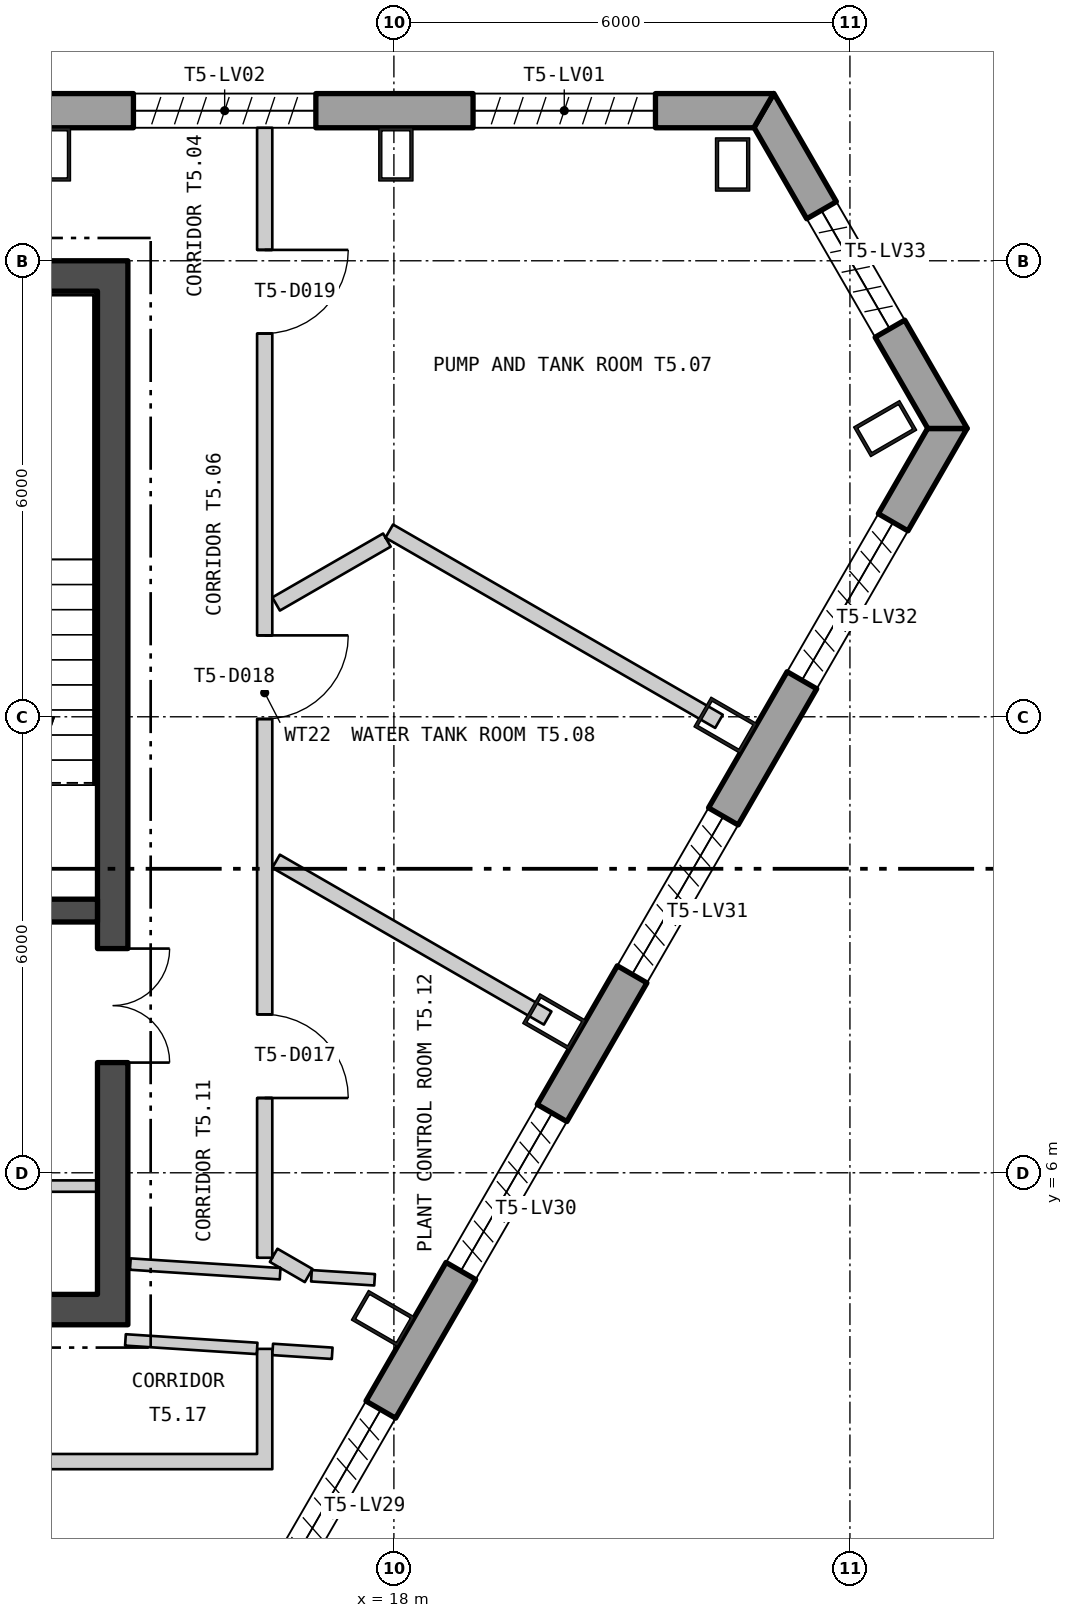
"""IFC4 building model, lengths in metres.
Left out: names, types, materials, properties, quantities, classifications, styles, units other than length and angle.
Written with IfcOpenShell. Run it as: python <this file> out.ifc"""

import sys

from ifc_helpers import new_model, si_unit, direction, frame, frame_2d, origin, origin_2d, place, context, subcontext, project, spatial, polyline, rectangle, hollow_rectangle, outline, extrude, element, fill, save


model = new_model("IFC4")
c1 = context("Model", 3, precision=1e-05, world=origin(), true_north=direction((0.0, 1.0)))
c2 = subcontext(c1, "Body", "Model", "MODEL_VIEW")
j1 = project(units=[si_unit("LENGTHUNIT", "METRE"), si_unit("PLANEANGLEUNIT", "RADIAN")], contexts=[c1])
p1 = place(None, origin())
s1 = spatial("IfcSite", under=j1, at=p1, CompositionType="ELEMENT")
p2 = place(p1, origin())
s2 = spatial("IfcBuilding", under=s1, at=p2, CompositionType="ELEMENT")
p3 = place(p2, frame((0.0, 0.0, 292.2)))
s3 = spatial("IfcBuildingStorey", under=s2, at=p3, CompositionType="ELEMENT", Elevation=292.2)
for number, where, z_axis, x_axis in (
    (1, (22.456, 19.267, 0.0), (0.0, 0.0, 1.0), (-1.0, 0.0, 0.0)),
    (2, (18.026, 19.4, 0.0), (0.0, 0.0, 1.0), (-1.0, 0.0, 0.0)),
    (3, (13.52, 19.4, 0.0), (0.0, 0.0, 1.0), (-1.0, 0.0, 0.0)),
    (4, (17.856, 4.083, 0.0), (0.0, 0.0, 1.0), (0.5, 0.866, 0.0)),
    (5, (20.11, 7.986, 0.0), (0.0, 0.0, 1.0), (0.5, 0.866, 0.0)),
    (6, (22.363, 11.889, 0.0), (0.0, 0.0, 1.0), (0.5, 0.866, 0.0)),
    (7, (24.463, 15.792, 0.0), (0.0, 0.0, 1.0), (-0.5, 0.866, 0.0)),
):
    element("IfcColumn", number, at=place(p3, frame(where, z_axis=z_axis, x_axis=x_axis)), inside=s3, PredefinedType="COLUMN", context=c2, shape_type="SweptSolid", body=[
        extrude(hollow_rectangle(XDim=0.45, YDim=0.7, WallThickness=0.04, at=origin_2d()), origin(), (0.0, 0.0, 1.0), 6.0),
    ])
p4 = place(p3, frame((22.865, 19.975, -0.4), z_axis=(0.0, 0.0, 1.0), x_axis=(-1.0, 0.0, 0.0)))
e8 = element("IfcWall", 8, at=p4, inside=s3, PredefinedType="SOLIDWALL", context=c2, shape_type="SweptSolid", body=[
    extrude(outline(polyline([(-0.13, -0.225), (45.86, -0.225), (45.6, 0.225), (0.13, 0.225), (-0.13, -0.225)])), origin(), (0.0, 0.0, 1.0), 6.0),
])
p5 = place(p4, frame((1.424, 0.0, 1.6)))
e9 = element("IfcOpeningElement", 9, at=p5, cuts=e8, PredefinedType="OPENING", context=c2, shape_type="SweptSolid", body=[
    extrude(rectangle(XDim=2.4, YDim=3.6, at=frame_2d((1.2, 1.8))), frame((0.0, 0.235, 0.0), z_axis=(0.0, -1.0, 0.0), x_axis=(1.0, 0.0, 0.0)), (0.0, 0.0, 1.0), 0.47),
])
p6 = place(p4, frame((5.892, 0.0, 1.6)))
e10 = element("IfcOpeningElement", 10, at=p6, cuts=e8, PredefinedType="OPENING", context=c2, shape_type="SweptSolid", body=[
    extrude(rectangle(XDim=2.4, YDim=3.6, at=frame_2d((1.2, 1.8))), frame((0.0, 0.235, 0.0), z_axis=(0.0, -1.0, 0.0), x_axis=(1.0, 0.0, 0.0)), (0.0, 0.0, 1.0), 0.47),
])
p7 = place(p4, frame((10.399, 0.0, 1.6)))
e11 = element("IfcOpeningElement", 11, at=p7, cuts=e8, PredefinedType="OPENING", context=c2, shape_type="SweptSolid", body=[
    extrude(rectangle(XDim=2.4, YDim=3.6, at=frame_2d((1.2, 1.8))), frame((0.0, 0.235, 0.0), z_axis=(0.0, -1.0, 0.0), x_axis=(1.0, 0.0, 0.0)), (0.0, 0.0, 1.0), 0.47),
])
p8 = place(p4, frame((14.905, 0.0, 1.6)))
e12 = element("IfcOpeningElement", 12, at=p8, cuts=e8, PredefinedType="OPENING", context=c2, shape_type="SweptSolid", body=[
    extrude(rectangle(XDim=2.4, YDim=3.6, at=frame_2d((1.2, 1.8))), frame((0.0, 0.235, 0.0), z_axis=(0.0, -1.0, 0.0), x_axis=(1.0, 0.0, 0.0)), (0.0, 0.0, 1.0), 0.47),
])
p9 = place(p4, frame((19.412, 0.0, 1.6)))
e13 = element("IfcOpeningElement", 13, at=p9, cuts=e8, PredefinedType="OPENING", context=c2, shape_type="SweptSolid", body=[
    extrude(rectangle(XDim=2.4, YDim=3.6, at=frame_2d((1.2, 1.8))), frame((0.0, 0.235, 0.0), z_axis=(0.0, -1.0, 0.0), x_axis=(1.0, 0.0, 0.0)), (0.0, 0.0, 1.0), 0.47),
])
p10 = place(p4, frame((23.918, 0.0, 1.6)))
e14 = element("IfcOpeningElement", 14, at=p10, cuts=e8, PredefinedType="OPENING", context=c2, shape_type="SweptSolid", body=[
    extrude(rectangle(XDim=2.4, YDim=3.6, at=frame_2d((1.2, 1.8))), frame((0.0, 0.235, 0.0), z_axis=(0.0, -1.0, 0.0), x_axis=(1.0, 0.0, 0.0)), (0.0, 0.0, 1.0), 0.47),
])
p11 = place(p4, frame((28.425, 0.0, 1.6)))
e15 = element("IfcOpeningElement", 15, at=p11, cuts=e8, PredefinedType="OPENING", context=c2, shape_type="SweptSolid", body=[
    extrude(rectangle(XDim=2.4, YDim=3.6, at=frame_2d((1.2, 1.8))), frame((0.0, 0.235, 0.0), z_axis=(0.0, -1.0, 0.0), x_axis=(1.0, 0.0, 0.0)), (0.0, 0.0, 1.0), 0.47),
])
p12 = place(p4, frame((32.932, 0.0, 1.6)))
e16 = element("IfcOpeningElement", 16, at=p12, cuts=e8, PredefinedType="OPENING", context=c2, shape_type="SweptSolid", body=[
    extrude(rectangle(XDim=2.4, YDim=3.6, at=frame_2d((1.2, 1.8))), frame((0.0, 0.235, 0.0), z_axis=(0.0, -1.0, 0.0), x_axis=(1.0, 0.0, 0.0)), (0.0, 0.0, 1.0), 0.47),
])
p13 = place(p4, frame((37.438, 0.0, 1.6)))
e17 = element("IfcOpeningElement", 17, at=p13, cuts=e8, PredefinedType="OPENING", context=c2, shape_type="SweptSolid", body=[
    extrude(rectangle(XDim=2.4, YDim=3.6, at=frame_2d((1.2, 1.8))), frame((0.0, 0.235, 0.0), z_axis=(0.0, -1.0, 0.0), x_axis=(1.0, 0.0, 0.0)), (0.0, 0.0, 1.0), 0.47),
])
p14 = place(p4, frame((41.907, 0.0, 1.6)))
e18 = element("IfcOpeningElement", 18, at=p14, cuts=e8, PredefinedType="OPENING", context=c2, shape_type="SweptSolid", body=[
    extrude(rectangle(XDim=2.4, YDim=3.6, at=frame_2d((1.2, 1.8))), frame((0.0, 0.235, 0.0), z_axis=(0.0, -1.0, 0.0), x_axis=(1.0, 0.0, 0.0)), (0.0, 0.0, 1.0), 0.47),
])
p15 = place(p3, frame((14.048, -3.663, -0.18), z_axis=(0.0, 0.0, 1.0), x_axis=(0.500002580931, 0.866023913678, 0.0)))
e19 = element("IfcWall", 19, at=p15, inside=s3, PredefinedType="SOLIDWALL", context=c2, shape_type="SweptSolid", body=[
    extrude(outline(polyline([(0.0, -0.225), (22.595, -0.225), (22.335, 0.225), (0.0, 0.225), (0.0, -0.225)])), origin(), (0.0, 0.0, 1.0), 5.9),
])
p16 = place(p15, frame((0.653, 0.0, 1.38)))
e20 = element("IfcOpeningElement", 20, at=p16, cuts=e19, PredefinedType="OPENING", context=c2, shape_type="SweptSolid", body=[
    extrude(rectangle(XDim=2.4, YDim=3.6, at=frame_2d((1.2, 1.8))), frame((0.0, 0.235, 0.0), z_axis=(0.0, -1.0, 0.0), x_axis=(1.0, 0.0, 0.0)), (0.0, 0.0, 1.0), 0.47),
])
p17 = place(p15, frame((5.16, 0.0, 1.38)))
e21 = element("IfcOpeningElement", 21, at=p17, cuts=e19, PredefinedType="OPENING", context=c2, shape_type="SweptSolid", body=[
    extrude(rectangle(XDim=2.4, YDim=3.6, at=frame_2d((1.2, 1.8))), frame((0.0, 0.235, 0.0), z_axis=(0.0, -1.0, 0.0), x_axis=(1.0, 0.0, 0.0)), (0.0, 0.0, 1.0), 0.47),
])
p18 = place(p15, frame((9.667, 0.0, 1.38)))
e22 = element("IfcOpeningElement", 22, at=p18, cuts=e19, PredefinedType="OPENING", context=c2, shape_type="SweptSolid", body=[
    extrude(rectangle(XDim=2.4, YDim=3.6, at=frame_2d((1.2, 1.8))), frame((0.0, 0.235, 0.0), z_axis=(0.0, -1.0, 0.0), x_axis=(1.0, 0.0, 0.0)), (0.0, 0.0, 1.0), 0.47),
])
p19 = place(p15, frame((14.173, 0.0, 1.38)))
e23 = element("IfcOpeningElement", 23, at=p19, cuts=e19, PredefinedType="OPENING", context=c2, shape_type="SweptSolid", body=[
    extrude(rectangle(XDim=2.4, YDim=3.6, at=frame_2d((1.2, 1.8))), frame((0.0, 0.235, 0.0), z_axis=(0.0, -1.0, 0.0), x_axis=(1.0, 0.0, 0.0)), (0.0, 0.0, 1.0), 0.47),
])
p20 = place(p15, frame((18.641, 0.0, 1.38)))
e24 = element("IfcOpeningElement", 24, at=p20, cuts=e19, PredefinedType="OPENING", context=c2, shape_type="SweptSolid", body=[
    extrude(rectangle(XDim=2.4, YDim=3.6, at=frame_2d((1.2, 1.8))), frame((0.0, 0.235, 0.0), z_axis=(0.0, -1.0, 0.0), x_axis=(1.0, 0.0, 0.0)), (0.0, 0.0, 1.0), 0.47),
])
p21 = place(p3, frame((25.284, 15.794, -0.4), z_axis=(0.0, 0.0, 1.0), x_axis=(-0.499997839997, 0.866026650859, 0.0)))
e25 = element("IfcWall", 25, at=p21, inside=s3, PredefinedType="SOLIDWALL", context=c2, shape_type="SweptSolid", body=[
    extrude(outline(polyline([(-0.13, -0.225), (4.96, -0.225), (4.7, 0.225), (0.13, 0.225), (-0.13, -0.225)])), origin(), (0.0, 0.0, 1.0), 6.0),
])
p22 = place(p21, frame((1.515, 0.0, 1.6)))
e26 = element("IfcOpeningElement", 26, at=p22, cuts=e25, PredefinedType="OPENING", context=c2, shape_type="SweptSolid", body=[
    extrude(rectangle(XDim=1.8, YDim=3.6, at=frame_2d((0.9, 1.8))), frame((0.0, 0.235, 0.0), z_axis=(0.0, -1.0, 0.0), x_axis=(1.0, 0.0, 0.0)), (0.0, 0.0, 1.0), 0.47),
])
p23 = place(p3, frame((-14.5, 4.2, 0.0), z_axis=(0.0, 0.0, 1.0), x_axis=(1.0, 0.0, 0.0)))
e27 = element("IfcWall", 27, at=p23, inside=s3, PredefinedType="SHEAR", context=c2, shape_type="SweptSolid", body=[
    extrude(rectangle(XDim=29.0, YDim=0.4, at=frame_2d((14.5, 0.0))), origin(), (0.0, 0.0, 1.0), 5.7),
])
p24 = place(p23, frame((9.0, 0.0, 0.0)))
e28 = element("IfcOpeningElement", 28, at=p24, cuts=e27, PredefinedType="OPENING", context=c2, shape_type="SweptSolid", body=[
    extrude(rectangle(XDim=1.8, YDim=2.4, at=frame_2d((0.9, 1.2))), frame((0.0, 0.21, 0.0), z_axis=(0.0, -1.0, 0.0), x_axis=(1.0, 0.0, 0.0)), (0.0, 0.0, 1.0), 0.42),
])
p25 = place(p23, frame((19.0, 0.0, 0.0)))
e29 = element("IfcOpeningElement", 29, at=p25, cuts=e27, PredefinedType="OPENING", context=c2, shape_type="SweptSolid", body=[
    extrude(rectangle(XDim=1.8, YDim=2.4, at=frame_2d((0.9, 1.2))), frame((0.0, 0.21, 0.0), z_axis=(0.0, -1.0, 0.0), x_axis=(1.0, 0.0, 0.0)), (0.0, 0.0, 1.0), 0.42),
])
p26 = place(p3, frame((-14.5, 17.8, 0.0), z_axis=(0.0, 0.0, 1.0), x_axis=(1.0, 0.0, 0.0)))
e30 = element("IfcWall", 30, at=p26, inside=s3, PredefinedType="SHEAR", context=c2, shape_type="SweptSolid", body=[
    extrude(rectangle(XDim=29.0, YDim=0.4, at=frame_2d((14.5, 0.0))), origin(), (0.0, 0.0, 1.0), 5.7),
])
p27 = place(p3, frame((14.3, 4.4, 0.0), z_axis=(0.0, 0.0, 1.0), x_axis=(0.0, 1.0, 0.0)))
e31 = element("IfcWall", 31, at=p27, inside=s3, PredefinedType="SHEAR", context=c2, shape_type="SweptSolid", body=[
    extrude(rectangle(XDim=13.2, YDim=0.4, at=frame_2d((6.6, 0.0))), origin(), (0.0, 0.0, 1.0), 5.7),
])
p28 = place(p27, frame((3.05, 0.0, 0.0)))
e32 = element("IfcOpeningElement", 32, at=p28, cuts=e31, PredefinedType="OPENING", context=c2, shape_type="SweptSolid", body=[
    extrude(rectangle(XDim=1.5, YDim=2.1, at=frame_2d((0.75, 1.05))), frame((0.0, 0.21, 0.0), z_axis=(0.0, -1.0, 0.0), x_axis=(1.0, 0.0, 0.0)), (0.0, 0.0, 1.0), 0.42),
])
p29 = place(p3, frame((11.0, 9.45, 0.0), z_axis=(0.0, 0.0, 1.0), x_axis=(1.0, 0.0, 0.0)))
e33 = element("IfcWall", 33, at=p29, inside=s3, PredefinedType="SHEAR", context=c2, shape_type="SweptSolid", body=[
    extrude(rectangle(XDim=3.1, YDim=0.3, at=frame_2d((1.55, 0.0))), origin(), (0.0, 0.0, 1.0), 5.7),
])
p30 = place(p29, frame((0.95, 0.0, 0.0)))
e34 = element("IfcOpeningElement", 34, at=p30, cuts=e33, PredefinedType="OPENING", context=c2, shape_type="SweptSolid", body=[
    extrude(rectangle(XDim=1.2, YDim=2.1, at=frame_2d((0.6, 1.05))), frame((0.0, 0.16, 0.0), z_axis=(0.0, -1.0, 0.0), x_axis=(1.0, 0.0, 0.0)), (0.0, 0.0, 1.0), 0.32),
])
p31 = place(p3, frame((11.0, 5.825, 0.0), z_axis=(0.0, 0.0, 1.0), x_axis=(1.0, 0.0, 0.0)))
e35 = element("IfcWall", 35, at=p31, inside=s3, PredefinedType="PARTITIONING", context=c2, shape_type="SweptSolid", body=[
    extrude(rectangle(XDim=3.1, YDim=0.15, at=frame_2d((1.55, 0.0))), origin(), (0.0, 0.0, 1.0), 5.7),
])
p32 = place(p3, frame((7.77, 2.2, 0.0), z_axis=(0.0, 0.0, 1.0), x_axis=(1.0, 0.0, 0.0)))
e36 = element("IfcWall", 36, at=p32, inside=s3, PredefinedType="PARTITIONING", context=c2, shape_type="SweptSolid", body=[
    extrude(rectangle(XDim=8.63, YDim=0.2, at=frame_2d((4.315, 0.0))), origin(), (0.0, 0.0, 1.0), 5.7),
])
p33 = place(p32, frame((3.59, 0.0, 0.0)))
e37 = element("IfcOpeningElement", 37, at=p33, cuts=e36, PredefinedType="OPENING", context=c2, shape_type="SweptSolid", body=[
    extrude(rectangle(XDim=1.1, YDim=2.1, at=frame_2d((0.55, 1.05))), frame((0.0, 0.11, 0.0), z_axis=(0.0, -1.0, 0.0), x_axis=(1.0, 0.0, 0.0)), (0.0, 0.0, 1.0), 0.22),
])
p34 = place(p3, frame((14.468, 3.801, 0.0), z_axis=(0.0, 0.0, 1.0), x_axis=(0.997915745008, -0.064530348407, 0.0)))
e38 = element("IfcWall", 38, at=p34, inside=s3, PredefinedType="PARTITIONING", context=c2, shape_type="SweptSolid", body=[
    extrude(rectangle(XDim=1.736, YDim=0.15, at=frame_2d((0.868, 0.0))), origin(), (0.0, 0.0, 1.0), 5.7),
])
p35 = place(p3, frame((14.532, 4.799, 0.0), z_axis=(0.0, 0.0, 1.0), x_axis=(0.997930552357, -0.064300953906, 0.0)))
e39 = element("IfcWall", 39, at=p35, inside=s3, PredefinedType="PARTITIONING", context=c2, shape_type="SweptSolid", body=[
    extrude(rectangle(XDim=1.975, YDim=0.15, at=frame_2d((0.988, 0.0))), origin(), (0.0, 0.0, 1.0), 5.7),
])
p36 = place(p3, frame((16.3, 2.3, 0.0), z_axis=(0.0, 0.0, 1.0), x_axis=(0.0, 1.0, 0.0)))
e40 = element("IfcWall", 40, at=p36, inside=s3, PredefinedType="PARTITIONING", context=c2, shape_type="SweptSolid", body=[
    extrude(rectangle(XDim=1.383, YDim=0.2, at=frame_2d((0.692, 0.0))), origin(), (0.0, 0.0, 1.0), 5.7),
])
p37 = place(p3, frame((16.3, 4.882, 0.0), z_axis=(0.0, 0.0, 1.0), x_axis=(0.0, 1.0, 0.0)))
e41 = element("IfcWall", 41, at=p37, inside=s3, PredefinedType="PARTITIONING", context=c2, shape_type="SweptSolid", body=[
    extrude(rectangle(XDim=14.868, YDim=0.2, at=frame_2d((7.434, 0.0))), origin(), (0.0, 0.0, 1.0), 5.7),
])
p38 = place(p37, frame((2.102, 0.0, 0.0)))
e42 = element("IfcOpeningElement", 42, at=p38, cuts=e41, PredefinedType="OPENING", context=c2, shape_type="SweptSolid", body=[
    extrude(rectangle(XDim=1.1, YDim=2.1, at=frame_2d((0.55, 1.05))), frame((0.0, 0.11, 0.0), z_axis=(0.0, -1.0, 0.0), x_axis=(1.0, 0.0, 0.0)), (0.0, 0.0, 1.0), 0.22),
])
p39 = place(p37, frame((7.089, 0.0, 0.0)))
e43 = element("IfcOpeningElement", 43, at=p39, cuts=e41, PredefinedType="OPENING", context=c2, shape_type="SweptSolid", body=[
    extrude(rectangle(XDim=1.1, YDim=2.1, at=frame_2d((0.55, 1.05))), frame((0.0, 0.11, 0.0), z_axis=(0.0, -1.0, 0.0), x_axis=(1.0, 0.0, 0.0)), (0.0, 0.0, 1.0), 0.22),
])
p40 = place(p37, frame((12.161, 0.0, 0.0)))
e44 = element("IfcOpeningElement", 44, at=p40, cuts=e41, PredefinedType="OPENING", context=c2, shape_type="SweptSolid", body=[
    extrude(rectangle(XDim=1.1, YDim=2.1, at=frame_2d((0.55, 1.05))), frame((0.0, 0.11, 0.0), z_axis=(0.0, -1.0, 0.0), x_axis=(1.0, 0.0, 0.0)), (0.0, 0.0, 1.0), 0.22),
])
p41 = place(p3, frame((16.405, 3.676, 0.0), z_axis=(0.0, 0.0, 1.0), x_axis=(0.997885500156, -0.064996373573, 0.0)))
e45 = element("IfcWall", 45, at=p41, inside=s3, PredefinedType="PARTITIONING", context=c2, shape_type="SweptSolid", body=[
    extrude(rectangle(XDim=0.785, YDim=0.15, at=frame_2d((0.392, 0.0))), origin(), (0.0, 0.0, 1.0), 5.7),
])
p42 = place(p3, frame((16.418, 4.914, 0.0), z_axis=(0.0, 0.0, 1.0), x_axis=(0.865683861507, -0.500591102524, 0.0)))
e46 = element("IfcWall", 46, at=p42, inside=s3, PredefinedType="PARTITIONING", context=c2, shape_type="SweptSolid", body=[
    extrude(rectangle(XDim=0.531, YDim=0.2, at=frame_2d((0.266, 0.0))), origin(), (0.0, 0.0, 1.0), 5.7),
])
p43 = place(p3, frame((16.45, 13.484, 0.0), z_axis=(0.0, 0.0, 1.0), x_axis=(0.866225147291, 0.499653874398, 0.0)))
e47 = element("IfcWall", 47, at=p43, inside=s3, PredefinedType="PARTITIONING", context=c2, shape_type="SweptSolid", body=[
    extrude(rectangle(XDim=1.683, YDim=0.2, at=frame_2d((0.842, 0.0))), origin(), (0.0, 0.0, 1.0), 5.7),
])
p44 = place(p3, frame((16.45, 10.099, 0.0), z_axis=(0.0, 0.0, 1.0), x_axis=(0.866012023309, -0.500023174947, 0.0)))
e48 = element("IfcWall", 48, at=p44, inside=s3, PredefinedType="PARTITIONING", context=c2, shape_type="SweptSolid", body=[
    extrude(rectangle(XDim=4.126, YDim=0.2, at=frame_2d((2.063, 0.0))), origin(), (0.0, 0.0, 1.0), 5.7),
])
p45 = place(p3, frame((16.915, 4.645, 0.0), z_axis=(0.0, 0.0, 1.0), x_axis=(0.997972330248, -0.063649258127, 0.0)))
e49 = element("IfcWall", 49, at=p45, inside=s3, PredefinedType="PARTITIONING", context=c2, shape_type="SweptSolid", body=[
    extrude(rectangle(XDim=0.833, YDim=0.15, at=frame_2d((0.416, 0.0))), origin(), (0.0, 0.0, 1.0), 5.7),
])
p46 = place(p3, frame((17.939, 14.443, 0.0), z_axis=(0.0, 0.0, 1.0), x_axis=(0.866158991994, -0.499768547017, 0.0)))
e50 = element("IfcWall", 50, at=p46, inside=s3, PredefinedType="PARTITIONING", context=c2, shape_type="SweptSolid", body=[
    extrude(rectangle(XDim=5.008, YDim=0.2, at=frame_2d((2.504, 0.0))), origin(), (0.0, 0.0, 1.0), 5.7),
])
p47 = place(p28, origin())
e51 = element("IfcDoor", 51, at=p47, inside=s3, OperationType="DOUBLE_DOOR_SINGLE_SWING", PredefinedType="DOOR", context=c2, shape_type="SweptSolid", body=[
    extrude(rectangle(XDim=1.5, YDim=2.1, at=frame_2d((0.75, 1.05))), frame((0.0, 0.025, 0.0), z_axis=(0.0, -1.0, 0.0), x_axis=(1.0, 0.0, 0.0)), (0.0, 0.0, 1.0), 0.05),
])
fill(e32, e51)
p48 = place(p38, origin())
e52 = element("IfcDoor", 52, at=p48, inside=s3, OperationType="SINGLE_SWING_LEFT", PredefinedType="DOOR", context=c2, shape_type="SweptSolid", body=[
    extrude(rectangle(XDim=1.1, YDim=2.1, at=frame_2d((0.55, 1.05))), frame((0.0, 0.025, 0.0), z_axis=(0.0, -1.0, 0.0), x_axis=(1.0, 0.0, 0.0)), (0.0, 0.0, 1.0), 0.05),
])
fill(e42, e52)
p49 = place(p39, origin())
e53 = element("IfcDoor", 53, at=p49, inside=s3, OperationType="SINGLE_SWING_RIGHT", PredefinedType="DOOR", context=c2, shape_type="SweptSolid", body=[
    extrude(rectangle(XDim=1.1, YDim=2.1, at=frame_2d((0.55, 1.05))), frame((0.0, 0.025, 0.0), z_axis=(0.0, -1.0, 0.0), x_axis=(1.0, 0.0, 0.0)), (0.0, 0.0, 1.0), 0.05),
])
fill(e43, e53)
p50 = place(p40, origin())
e54 = element("IfcDoor", 54, at=p50, inside=s3, OperationType="SINGLE_SWING_RIGHT", PredefinedType="DOOR", context=c2, shape_type="SweptSolid", body=[
    extrude(rectangle(XDim=1.1, YDim=2.1, at=frame_2d((0.55, 1.05))), frame((0.0, 0.025, 0.0), z_axis=(0.0, -1.0, 0.0), x_axis=(1.0, 0.0, 0.0)), (0.0, 0.0, 1.0), 0.05),
])
fill(e44, e54)
save(model, sys.argv[1])
